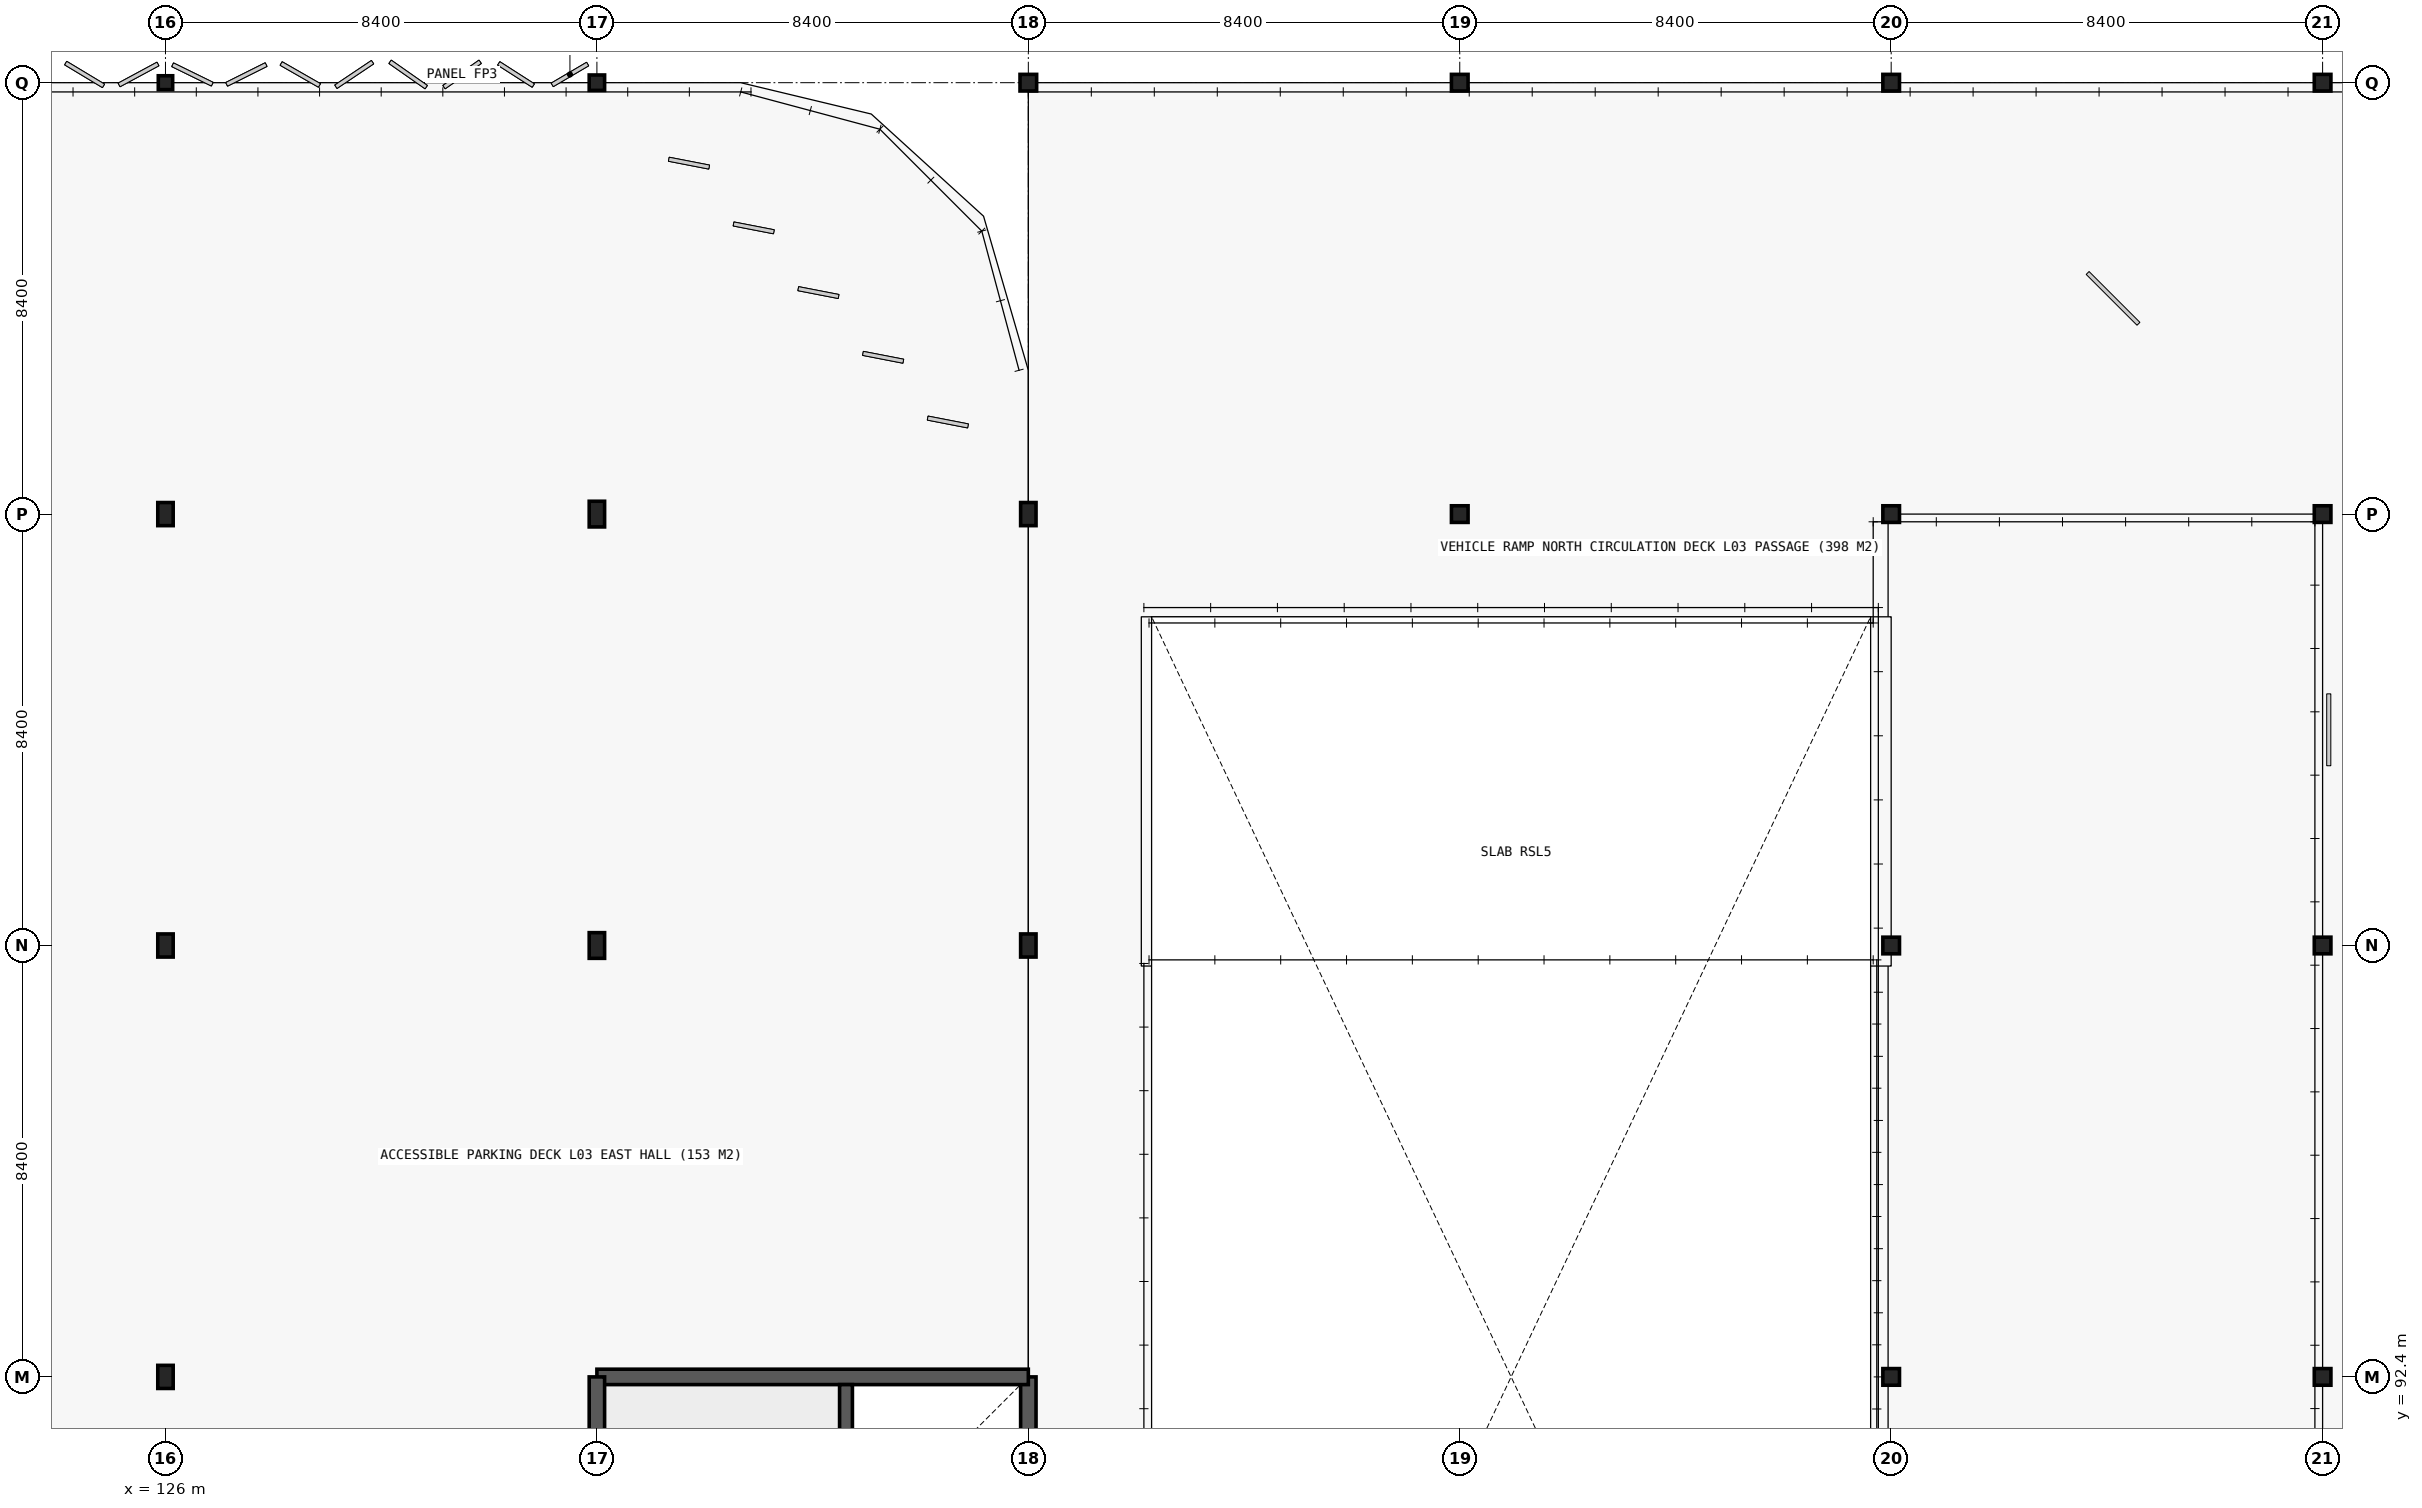
"""IFC4 building model, lengths in metres.
Left out: names, types, materials, properties, quantities, classifications, styles, units other than length and angle.
Written with IfcOpenShell. Run it as: python <this file> out.ifc"""

import sys

from ifc_helpers import new_model, si_unit, direction, frame, frame_2d, origin, origin_2d, place, context, subcontext, project, spatial, rectangle, hollow_circle, i_section, extrude, element, save


model = new_model("IFC4")
c1 = context("Model", 3, precision=1e-05, world=origin(), true_north=direction((0.0, 1.0)))
c2 = subcontext(c1, "Body", "Model", "MODEL_VIEW")
j1 = project(units=[si_unit("LENGTHUNIT", "METRE"), si_unit("PLANEANGLEUNIT", "RADIAN")], contexts=[c1])
p1 = place(None, origin())
s1 = spatial("IfcSite", under=j1, at=p1, CompositionType="ELEMENT")
p2 = place(p1, origin())
s2 = spatial("IfcBuilding", under=s1, at=p2, CompositionType="ELEMENT")
p3 = place(p2, frame((0.0, 0.0, 13.2)))
s3 = spatial("IfcBuildingStorey", under=s2, at=p3, CompositionType="ELEMENT", Elevation=13.2)
p4 = place(p3, frame((142.8, 84.0, 0.0), z_axis=(0.0, 0.0, 1.0), x_axis=(0.0, 1.0, 0.0)))
e1 = element("IfcWall", 1, at=p4, inside=s3, PredefinedType="SHEAR", context=c2, shape_type="SweptSolid", body=[
    extrude(rectangle(XDim=8.4, YDim=0.3, at=frame_2d((4.2, 0.0))), origin(), (0.0, 0.0, 1.0), 4.2),
])
p5 = place(p3, frame((142.8, 92.4, 0.0), z_axis=(0.0, 0.0, 1.0), x_axis=(-1.0, 0.0, 0.0)))
e2 = element("IfcWall", 2, at=p5, inside=s3, PredefinedType="SHEAR", context=c2, shape_type="SweptSolid", body=[
    extrude(rectangle(XDim=8.4, YDim=0.3, at=frame_2d((4.2, 0.0))), origin(), (0.0, 0.0, 1.0), 4.2),
])
p6 = place(p3, frame((134.4, 92.4, 0.0), z_axis=(0.0, 0.0, 1.0), x_axis=(0.0, -1.0, 0.0)))
e3 = element("IfcWall", 3, at=p6, inside=s3, PredefinedType="SHEAR", context=c2, shape_type="SweptSolid", body=[
    extrude(rectangle(XDim=8.4, YDim=0.3, at=frame_2d((4.2, 0.0))), origin(), (0.0, 0.0, 1.0), 4.2),
])
p7 = place(p3, frame((139.25, 84.15, 0.0), z_axis=(0.0, 0.0, 1.0), x_axis=(0.0, 1.0, 0.0)))
e4 = element("IfcWall", 4, at=p7, inside=s3, PredefinedType="SHEAR", context=c2, shape_type="SweptSolid", body=[
    extrude(rectangle(XDim=8.1, YDim=0.25, at=frame_2d((4.05, 0.0))), origin(), (0.0, 0.0, 1.0), 4.2),
])
for number, where, z_axis, x_axis in (
    (5, (126.0, 92.4, 0.0), (0.0, 0.0, 1.0), (1.0, 0.0, 0.0)),
    (6, (126.0, 100.8, 0.0), (0.0, 0.0, 1.0), (1.0, 0.0, 0.0)),
    (7, (126.0, 109.2, 0.0), (0.0, 0.0, 1.0), (1.0, 0.0, 0.0)),
):
    element("IfcColumn", number, at=place(p3, frame(where, z_axis=z_axis, x_axis=x_axis)), inside=s3, PredefinedType="COLUMN", context=c2, shape_type="SweptSolid", body=[
        extrude(i_section(OverallWidth=0.3, OverallDepth=0.45, WebThickness=0.014, FlangeThickness=0.026, FilletRadius=0.027, at=origin_2d()), origin(), (0.0, 0.0, 1.0), 4.2),
    ])
p8 = place(p3, frame((126.0, 117.6, 0.0), z_axis=(0.0, 0.0, 1.0), x_axis=(1.0, 0.0, 0.0)))
e8 = element("IfcColumn", 8, at=p8, inside=s3, PredefinedType="COLUMN", context=c2, shape_type="SweptSolid", body=[
    extrude(i_section(OverallWidth=0.28, OverallDepth=0.27, WebThickness=0.008, FlangeThickness=0.013, FilletRadius=0.024, at=origin_2d()), origin(), (0.0, 0.0, 1.0), 3.958),
])
for number, where, z_axis, x_axis in (
    (9, (134.4, 100.8, 0.0), (0.0, 0.0, 1.0), (1.0, 0.0, 0.0)),
    (10, (134.4, 109.2, 0.0), (0.0, 0.0, 1.0), (1.0, 0.0, 0.0)),
):
    element("IfcColumn", number, at=place(p3, frame(where, z_axis=z_axis, x_axis=x_axis)), inside=s3, PredefinedType="COLUMN", context=c2, shape_type="SweptSolid", body=[
        extrude(i_section(OverallWidth=0.3, OverallDepth=0.5, WebThickness=0.014, FlangeThickness=0.028, FilletRadius=0.027, at=origin_2d()), origin(), (0.0, 0.0, 1.0), 4.2),
    ])
p9 = place(p3, frame((134.4, 117.6, 0.0), z_axis=(0.0, 0.0, 1.0), x_axis=(1.0, 0.0, 0.0)))
e11 = element("IfcColumn", 11, at=p9, inside=s3, PredefinedType="COLUMN", context=c2, shape_type="SweptSolid", body=[
    extrude(i_section(OverallWidth=0.3, OverallDepth=0.3, WebThickness=0.011, FlangeThickness=0.019, FilletRadius=0.027, at=origin_2d()), origin(), (0.0, 0.0, 1.0), 3.958),
])
for number, where, z_axis, x_axis in (
    (12, (142.8, 100.8, 0.0), (0.0, 0.0, 1.0), (1.0, 0.0, 0.0)),
    (13, (142.8, 109.2, 0.0), (0.0, 0.0, 1.0), (1.0, 0.0, 0.0)),
):
    element("IfcColumn", number, at=place(p3, frame(where, z_axis=z_axis, x_axis=x_axis)), inside=s3, PredefinedType="COLUMN", context=c2, shape_type="SweptSolid", body=[
        extrude(i_section(OverallWidth=0.3, OverallDepth=0.45, WebThickness=0.014, FlangeThickness=0.026, FilletRadius=0.027, at=origin_2d()), origin(), (0.0, 0.0, 1.0), 4.2),
    ])
for number, where, z_axis, x_axis in (
    (14, (142.8, 117.6, 0.0), (0.0, 0.0, 1.0), (1.0, 0.0, 0.0)),
    (15, (151.2, 109.2, 0.0), (0.0, 0.0, 1.0), (1.0, 0.0, 0.0)),
    (16, (151.2, 117.6, 0.0), (0.0, 0.0, 1.0), (1.0, 0.0, 0.0)),
    (17, (159.6, 92.4, 0.0), (0.0, 0.0, 1.0), (1.0, 0.0, 0.0)),
    (18, (159.6, 100.8, 0.0), (0.0, 0.0, 1.0), (1.0, 0.0, 0.0)),
    (19, (159.6, 109.2, 0.0), (0.0, 0.0, 1.0), (1.0, 0.0, 0.0)),
    (20, (159.6, 117.6, 0.0), (0.0, 0.0, 1.0), (1.0, 0.0, 0.0)),
    (21, (168.0, 92.4, 0.0), (0.0, 0.0, 1.0), (1.0, 0.0, 0.0)),
    (22, (168.0, 100.8, 0.0), (0.0, 0.0, 1.0), (1.0, 0.0, 0.0)),
    (23, (168.0, 109.2, 0.0), (0.0, 0.0, 1.0), (1.0, 0.0, 0.0)),
    (24, (168.0, 117.6, 0.0), (0.0, 0.0, 1.0), (1.0, 0.0, 0.0)),
):
    element("IfcColumn", number, at=place(p3, frame(where, z_axis=z_axis, x_axis=x_axis)), inside=s3, PredefinedType="COLUMN", context=c2, shape_type="SweptSolid", body=[
        extrude(hollow_circle(Radius=0.162, WallThickness=0.01, at=origin_2d()), origin(), (0.0, 0.0, 1.0), 4.2),
    ])
save(model, sys.argv[1])
